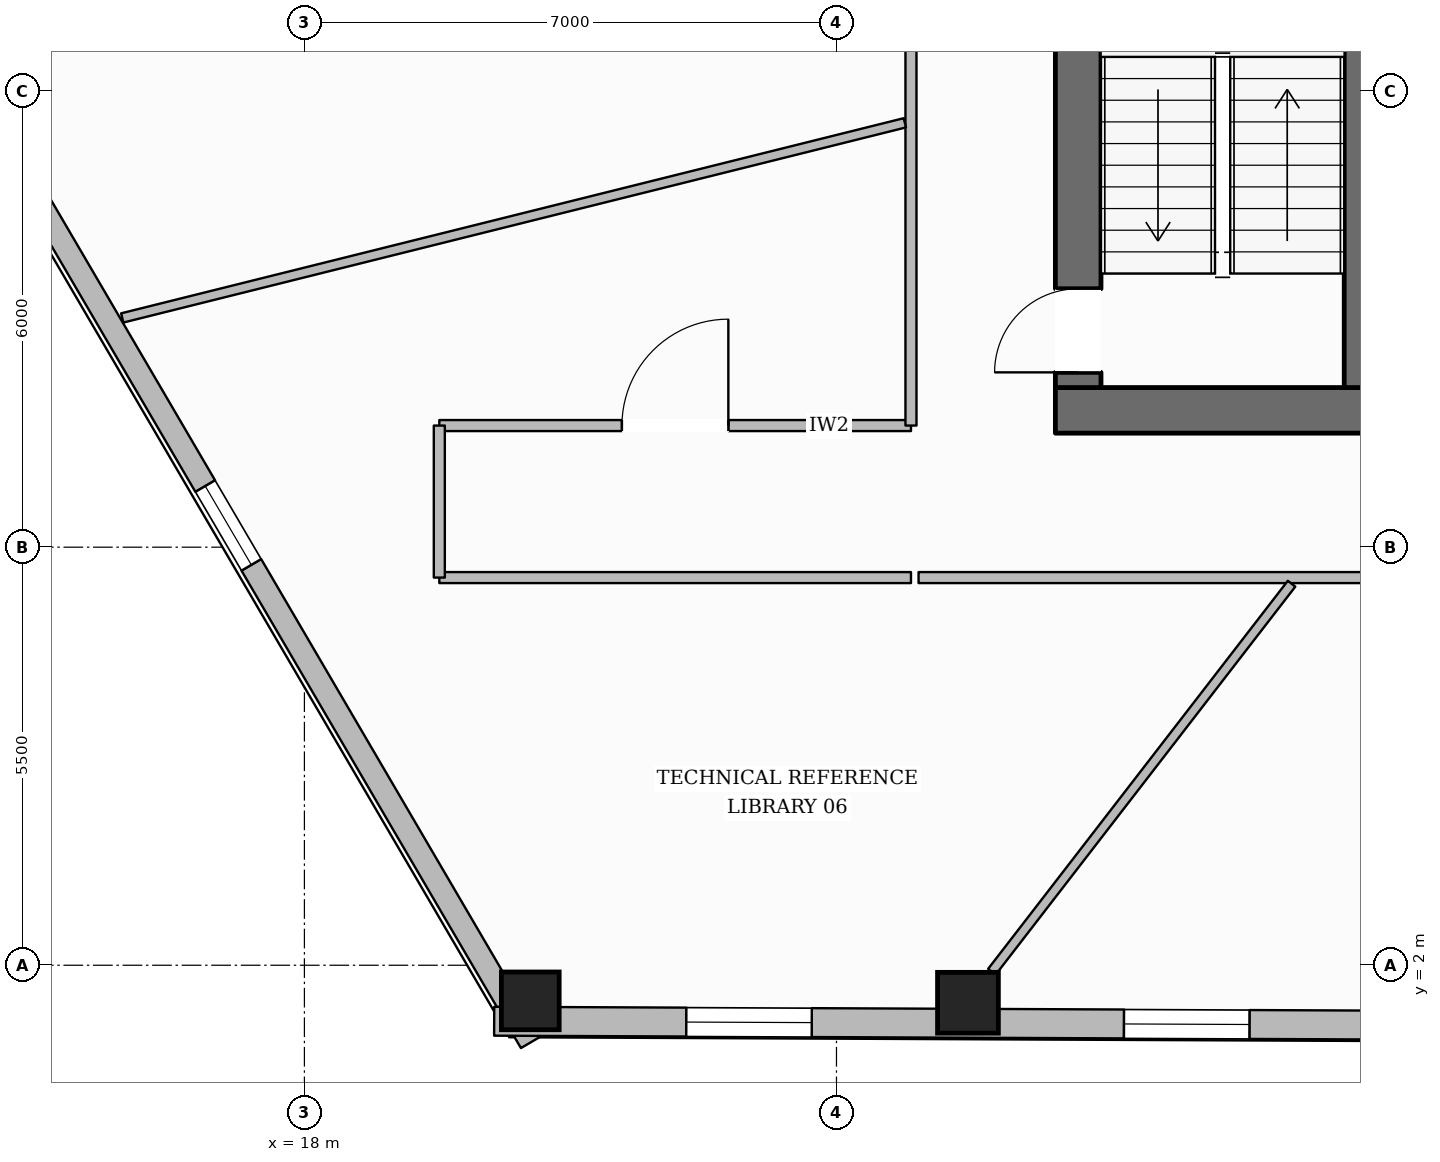
"""IFC4 building model, lengths in metres.
Left out: names, types, materials, properties, quantities, classifications, styles, units other than length and angle.
Written with IfcOpenShell. Run it as: python <this file> out.ifc"""

import sys

from ifc_helpers import new_model, si_unit, direction, frame, frame_2d, origin, origin_2d, place, context, subcontext, project, spatial, rectangle, hollow_rectangle, extrude, element, fill, save


model = new_model("IFC4")
c1 = context("Model", 3, precision=1e-05, world=origin(), true_north=direction((0.0, 1.0)))
c2 = subcontext(c1, "Body", "Model", "MODEL_VIEW")
j1 = project(units=[si_unit("LENGTHUNIT", "METRE"), si_unit("PLANEANGLEUNIT", "RADIAN")], contexts=[c1])
p1 = place(None, origin())
s1 = spatial("IfcSite", under=j1, at=p1, CompositionType="ELEMENT")
p2 = place(p1, origin())
s2 = spatial("IfcBuilding", under=s1, at=p2, CompositionType="ELEMENT")
p3 = place(p2, frame((0.0, 0.0, 52.2)))
s3 = spatial("IfcBuildingStorey", under=s2, at=p3, CompositionType="ELEMENT", Elevation=52.2)
p4 = place(p3, frame((27.88, 9.3, 0.0), z_axis=(0.0, 0.0, 1.0), x_axis=(1.0, 0.0, 0.0)))
e1 = element("IfcWall", 1, at=p4, inside=s3, PredefinedType="SOLIDWALL", context=c2, shape_type="SweptSolid", body=[
    extrude(rectangle(XDim=20.24, YDim=0.6, at=frame_2d((10.12, 0.0))), origin(), (0.0, 0.0, 1.0), 3.59),
])
p5 = place(p4, frame((10.62, 0.0, 0.0)))
e2 = element("IfcOpeningElement", 2, at=p5, cuts=e1, PredefinedType="OPENING", context=c2, shape_type="SweptSolid", body=[
    extrude(rectangle(XDim=1.4, YDim=2.2, at=frame_2d((0.7, 1.1))), frame((0.0, 0.31, 0.0), z_axis=(0.0, -1.0, 0.0), x_axis=(1.0, 0.0, 0.0)), (0.0, 0.0, 1.0), 0.62),
])
p6 = place(p3, frame((28.18, 9.6, 0.0), z_axis=(0.0, 0.0, 1.0), x_axis=(0.0, 1.0, 0.0)))
e3 = element("IfcWall", 3, at=p6, inside=s3, PredefinedType="SOLIDWALL", context=c2, shape_type="SweptSolid", body=[
    extrude(rectangle(XDim=13.0, YDim=0.6, at=frame_2d((6.5, 0.0))), origin(), (0.0, 0.0, 1.0), 3.59),
])
p7 = place(p6, frame((0.2, 0.0, 0.0)))
e4 = element("IfcOpeningElement", 4, at=p7, cuts=e3, PredefinedType="OPENING", context=c2, shape_type="SweptSolid", body=[
    extrude(rectangle(XDim=1.1, YDim=2.15, at=frame_2d((0.55, 1.075))), frame((0.0, 0.31, 0.0), z_axis=(0.0, -1.0, 0.0), x_axis=(1.0, 0.0, 0.0)), (0.0, 0.0, 1.0), 0.62),
])
p8 = place(p6, frame((8.4, 0.0, 0.0)))
e5 = element("IfcOpeningElement", 5, at=p8, cuts=e3, PredefinedType="OPENING", context=c2, shape_type="SweptSolid", body=[
    extrude(rectangle(XDim=0.9, YDim=2.1, at=frame_2d((0.45, 1.05))), frame((0.0, 0.31, 0.0), z_axis=(0.0, -1.0, 0.0), x_axis=(1.0, 0.0, 0.0)), (0.0, 0.0, 1.0), 0.62),
])
p9 = place(p3, frame((31.81, 9.6, 0.0), z_axis=(0.0, 0.0, 1.0), x_axis=(0.0, 1.0, 0.0)))
e6 = element("IfcWall", 6, at=p9, inside=s3, PredefinedType="SHEAR", context=c2, shape_type="SweptSolid", body=[
    extrude(rectangle(XDim=13.0, YDim=0.26, at=frame_2d((6.5, 0.0))), origin(), (0.0, 0.0, 1.0), 3.59),
])
p10 = place(p9, frame((10.925, 0.0, 0.0)))
e7 = element("IfcOpeningElement", 7, at=p10, cuts=e6, PredefinedType="OPENING", context=c2, shape_type="SweptSolid", body=[
    extrude(rectangle(XDim=1.25, YDim=2.25, at=frame_2d((0.625, 1.125))), frame((0.0, 0.14, 0.0), z_axis=(0.0, -1.0, 0.0), x_axis=(1.0, 0.0, 0.0)), (0.0, 0.0, 1.0), 0.28),
])
p11 = place(p3, frame((20.972, 1.531, 0.0), z_axis=(0.0, 0.0, 1.0), x_axis=(1.0, 0.0, 0.0)))
e8 = element("IfcColumn", 8, at=p11, inside=s3, PredefinedType="COLUMN", context=c2, shape_type="SweptSolid", body=[
    extrude(hollow_rectangle(XDim=0.76, YDim=0.76, WallThickness=0.035, at=origin_2d()), origin(), (0.0, 0.0, 1.0), 3.59),
])
p12 = place(p3, frame((26.73, 1.507, 0.0), z_axis=(0.0, 0.0, 1.0), x_axis=(1.0, 0.0, 0.0)))
e9 = element("IfcColumn", 9, at=p12, inside=s3, PredefinedType="COLUMN", context=c2, shape_type="SweptSolid", body=[
    extrude(hollow_rectangle(XDim=0.8, YDim=0.8, WallThickness=0.036, at=origin_2d()), origin(), (0.0, 0.0, 1.0), 3.59),
])
p13 = place(p3, frame((13.02, 14.028, 0.0), z_axis=(0.0, 0.0, 1.0), x_axis=(0.501385664719, 0.86522391045, 0.0)))
e10 = element("IfcWall", 10, at=p13, inside=s3, PredefinedType="STANDARD", context=c2, shape_type="SweptSolid", body=[
    extrude(rectangle(XDim=35.142, YDim=0.38, at=frame_2d((17.571, 0.0))), origin(), (0.0, 0.0, 1.0), 2.97),
])
p14 = place(p13, frame((30.991, 0.0, 0.65)))
e11 = element("IfcOpeningElement", 11, at=p14, cuts=e10, PredefinedType="OPENING", context=c2, shape_type="SweptSolid", body=[
    extrude(rectangle(XDim=1.65, YDim=1.75, at=frame_2d((0.825, 0.875))), frame((0.0, 0.2, 0.0), z_axis=(0.0, -1.0, 0.0), x_axis=(1.0, 0.0, 0.0)), (0.0, 0.0, 1.0), 0.4),
])
p15 = place(p13, frame((25.293, 0.0, 0.65)))
e12 = element("IfcOpeningElement", 12, at=p15, cuts=e10, PredefinedType="OPENING", context=c2, shape_type="SweptSolid", body=[
    extrude(rectangle(XDim=1.65, YDim=1.75, at=frame_2d((0.825, 0.875))), frame((0.0, 0.2, 0.0), z_axis=(0.0, -1.0, 0.0), x_axis=(1.0, 0.0, 0.0)), (0.0, 0.0, 1.0), 0.4),
])
p16 = place(p13, frame((13.898, 0.0, 0.65)))
e13 = element("IfcOpeningElement", 13, at=p16, cuts=e10, PredefinedType="OPENING", context=c2, shape_type="SweptSolid", body=[
    extrude(rectangle(XDim=1.65, YDim=1.75, at=frame_2d((0.825, 0.875))), frame((0.0, 0.2, 0.0), z_axis=(0.0, -1.0, 0.0), x_axis=(1.0, 0.0, 0.0)), (0.0, 0.0, 1.0), 0.4),
])
p17 = place(p13, frame((8.201, 0.0, 0.65)))
e14 = element("IfcOpeningElement", 14, at=p17, cuts=e10, PredefinedType="OPENING", context=c2, shape_type="SweptSolid", body=[
    extrude(rectangle(XDim=1.65, YDim=1.75, at=frame_2d((0.825, 0.875))), frame((0.0, 0.2, 0.0), z_axis=(0.0, -1.0, 0.0), x_axis=(1.0, 0.0, 0.0)), (0.0, 0.0, 1.0), 0.4),
])
p18 = place(p13, frame((2.503, 0.0, 0.65)))
e15 = element("IfcOpeningElement", 15, at=p18, cuts=e10, PredefinedType="OPENING", context=c2, shape_type="SweptSolid", body=[
    extrude(rectangle(XDim=1.65, YDim=1.75, at=frame_2d((0.825, 0.875))), frame((0.0, 0.2, 0.0), z_axis=(0.0, -1.0, 0.0), x_axis=(1.0, 0.0, 0.0)), (0.0, 0.0, 1.0), 0.4),
])
p19 = place(p3, frame((20.978, 0.986, 0.0), z_axis=(0.0, 0.0, 1.0), x_axis=(-0.50510939728, 0.863055326604, 0.0)))
e16 = element("IfcWall", 16, at=p19, inside=s3, PredefinedType="STANDARD", context=c2, shape_type="SweptSolid", body=[
    extrude(rectangle(XDim=15.757, YDim=0.3, at=frame_2d((7.878, 0.0))), origin(), (0.0, 0.0, 1.0), 2.97),
])
p20 = place(p19, frame((7.279, 0.0, 0.65)))
e17 = element("IfcOpeningElement", 17, at=p20, cuts=e16, PredefinedType="OPENING", context=c2, shape_type="SweptSolid", body=[
    extrude(rectangle(XDim=1.2, YDim=1.7, at=frame_2d((0.6, 0.85))), frame((0.0, 0.16, 0.0), z_axis=(0.0, -1.0, 0.0), x_axis=(1.0, 0.0, 0.0)), (0.0, 0.0, 1.0), 0.32),
])
p21 = place(p3, frame((55.997, 1.11, 0.0), z_axis=(0.0, 0.0, 1.0), x_axis=(-0.999990674144, 0.004318752662, 0.0)))
e18 = element("IfcWall", 18, at=p21, inside=s3, PredefinedType="STANDARD", context=c2, shape_type="SweptSolid", body=[
    extrude(rectangle(XDim=35.501, YDim=0.38, at=frame_2d((17.75, 0.0))), origin(), (0.0, 0.0, 1.0), 2.97),
])
p22 = place(p21, frame((31.323, 0.0, 0.65)))
e19 = element("IfcOpeningElement", 19, at=p22, cuts=e18, PredefinedType="OPENING", context=c2, shape_type="SweptSolid", body=[
    extrude(rectangle(XDim=1.65, YDim=1.75, at=frame_2d((0.825, 0.875))), frame((0.0, 0.2, 0.0), z_axis=(0.0, -1.0, 0.0), x_axis=(1.0, 0.0, 0.0)), (0.0, 0.0, 1.0), 0.4),
])
p23 = place(p21, frame((25.565, 0.0, 0.65)))
e20 = element("IfcOpeningElement", 20, at=p23, cuts=e18, PredefinedType="OPENING", context=c2, shape_type="SweptSolid", body=[
    extrude(rectangle(XDim=1.65, YDim=1.75, at=frame_2d((0.825, 0.875))), frame((0.0, 0.2, 0.0), z_axis=(0.0, -1.0, 0.0), x_axis=(1.0, 0.0, 0.0)), (0.0, 0.0, 1.0), 0.4),
])
p24 = place(p21, frame((14.049, 0.0, 0.65)))
e21 = element("IfcOpeningElement", 21, at=p24, cuts=e18, PredefinedType="OPENING", context=c2, shape_type="SweptSolid", body=[
    extrude(rectangle(XDim=1.65, YDim=1.75, at=frame_2d((0.825, 0.875))), frame((0.0, 0.2, 0.0), z_axis=(0.0, -1.0, 0.0), x_axis=(1.0, 0.0, 0.0)), (0.0, 0.0, 1.0), 0.4),
])
p25 = place(p21, frame((8.29, 0.0, 0.65)))
e22 = element("IfcOpeningElement", 22, at=p25, cuts=e18, PredefinedType="OPENING", context=c2, shape_type="SweptSolid", body=[
    extrude(rectangle(XDim=1.65, YDim=1.75, at=frame_2d((0.825, 0.875))), frame((0.0, 0.2, 0.0), z_axis=(0.0, -1.0, 0.0), x_axis=(1.0, 0.0, 0.0)), (0.0, 0.0, 1.0), 0.4),
])
p26 = place(p21, frame((2.532, 0.0, 0.65)))
e23 = element("IfcOpeningElement", 23, at=p26, cuts=e18, PredefinedType="OPENING", context=c2, shape_type="SweptSolid", body=[
    extrude(rectangle(XDim=1.65, YDim=1.75, at=frame_2d((0.825, 0.875))), frame((0.0, 0.2, 0.0), z_axis=(0.0, -1.0, 0.0), x_axis=(1.0, 0.0, 0.0)), (0.0, 0.0, 1.0), 0.4),
])
p27 = place(p3, frame((19.775, 9.1, 0.0), z_axis=(0.0, 0.0, 1.0), x_axis=(1.0, 0.0, 0.0)))
e24 = element("IfcWall", 24, at=p27, inside=s3, PredefinedType="PARTITIONING", context=c2, shape_type="SweptSolid", body=[
    extrude(rectangle(XDim=6.205, YDim=0.145, at=frame_2d((3.103, 0.0))), origin(), (0.0, 0.0, 1.0), 3.59),
])
p28 = place(p27, frame((2.403, 0.0, 0.0)))
e25 = element("IfcOpeningElement", 25, at=p28, cuts=e24, PredefinedType="OPENING", context=c2, shape_type="SweptSolid", body=[
    extrude(rectangle(XDim=1.4, YDim=2.2, at=frame_2d((0.7, 1.1))), frame((0.0, 0.083, 0.0), z_axis=(0.0, -1.0, 0.0), x_axis=(1.0, 0.0, 0.0)), (0.0, 0.0, 1.0), 0.165),
])
p29 = place(p3, frame((25.98, 9.1, 0.0), z_axis=(0.0, 0.0, 1.0), x_axis=(0.0, 1.0, 0.0)))
e26 = element("IfcWall", 26, at=p29, inside=s3, PredefinedType="PARTITIONING", context=c2, shape_type="SweptSolid", body=[
    extrude(rectangle(XDim=16.0, YDim=0.145, at=frame_2d((8.0, 0.0))), origin(), (0.0, 0.0, 1.0), 3.278),
])
p30 = place(p29, frame((13.722, 0.0, 0.0)))
e27 = element("IfcOpeningElement", 27, at=p30, cuts=e26, PredefinedType="OPENING", context=c2, shape_type="SweptSolid", body=[
    extrude(rectangle(XDim=0.98, YDim=2.15, at=frame_2d((0.49, 1.075))), frame((0.0, 0.083, 0.0), z_axis=(0.0, -1.0, 0.0), x_axis=(1.0, 0.0, 0.0)), (0.0, 0.0, 1.0), 0.165),
])
p31 = place(p29, frame((7.387, 0.0, 0.0)))
e28 = element("IfcOpeningElement", 28, at=p31, cuts=e26, PredefinedType="OPENING", context=c2, shape_type="SweptSolid", body=[
    extrude(rectangle(XDim=1.4, YDim=2.2, at=frame_2d((0.7, 1.1))), frame((0.0, 0.083, 0.0), z_axis=(0.0, -1.0, 0.0), x_axis=(1.0, 0.0, 0.0)), (0.0, 0.0, 1.0), 0.165),
])
p32 = place(p3, frame((49.92, 7.1, 0.0), z_axis=(0.0, 0.0, 1.0), x_axis=(-1.0, 0.0, 0.0)))
e29 = element("IfcWall", 29, at=p32, inside=s3, PredefinedType="PARTITIONING", context=c2, shape_type="SweptSolid", body=[
    extrude(rectangle(XDim=23.84, YDim=0.145, at=frame_2d((11.92, 0.0))), origin(), (0.0, 0.0, 1.0), 3.278),
])
p33 = place(p32, frame((11.094, 0.0, 0.0)))
e30 = element("IfcOpeningElement", 30, at=p33, cuts=e29, PredefinedType="OPENING", context=c2, shape_type="SweptSolid", body=[
    extrude(rectangle(XDim=1.4, YDim=2.2, at=frame_2d((0.7, 1.1))), frame((0.0, 0.083, 0.0), z_axis=(0.0, -1.0, 0.0), x_axis=(1.0, 0.0, 0.0)), (0.0, 0.0, 1.0), 0.165),
])
p34 = place(p3, frame((25.98, 7.1, 0.0), z_axis=(0.0, 0.0, 1.0), x_axis=(-1.0, 0.0, 0.0)))
e31 = element("IfcWall", 31, at=p34, inside=s3, PredefinedType="PARTITIONING", context=c2, shape_type="SweptSolid", body=[
    extrude(rectangle(XDim=6.205, YDim=0.145, at=frame_2d((3.103, 0.0))), origin(), (0.0, 0.0, 1.0), 3.59),
])
p35 = place(p3, frame((19.775, 7.1, 0.0), z_axis=(0.0, 0.0, 1.0), x_axis=(0.0, 1.0, 0.0)))
e32 = element("IfcWall", 32, at=p35, inside=s3, PredefinedType="PARTITIONING", context=c2, shape_type="SweptSolid", body=[
    extrude(rectangle(XDim=2.0, YDim=0.145, at=frame_2d((1.0, 0.0))), origin(), (0.0, 0.0, 1.0), 3.59),
])
p36 = place(p3, frame((25.899, 13.083, 0.0), z_axis=(0.0, 0.0, 1.0), x_axis=(-0.970293892869, -0.241929248874, 0.0)))
e33 = element("IfcWall", 33, at=p36, inside=s3, PredefinedType="PARTITIONING", context=c2, shape_type="SweptSolid", body=[
    extrude(rectangle(XDim=10.611, YDim=0.125, at=frame_2d((5.306, 0.0))), origin(), (0.0, 0.0, 1.0), 3.59),
])
p37 = place(p3, frame((30.987, 7.02, 0.0), z_axis=(0.0, 0.0, 1.0), x_axis=(-0.61121694186, -0.791463107152, 0.0)))
e34 = element("IfcWall", 34, at=p37, inside=s3, PredefinedType="PARTITIONING", context=c2, shape_type="SweptSolid", body=[
    extrude(rectangle(XDim=6.45, YDim=0.125, at=frame_2d((3.225, 0.0))), origin(), (0.0, 0.0, 1.0), 3.59),
])
p38 = place(p22, origin())
e35 = element("IfcWindow", 35, at=p38, inside=s3, PartitioningType="SINGLE_PANEL", PredefinedType="WINDOW", context=c2, shape_type="SweptSolid", body=[
    extrude(rectangle(XDim=1.65, YDim=1.75, at=frame_2d((0.825, 0.875))), frame((0.0, 0.03, 0.0), z_axis=(0.0, -1.0, 0.0), x_axis=(1.0, 0.0, 0.0)), (0.0, 0.0, 1.0), 0.06),
])
fill(e19, e35)
p39 = place(p23, origin())
e36 = element("IfcWindow", 36, at=p39, inside=s3, PartitioningType="SINGLE_PANEL", PredefinedType="WINDOW", context=c2, shape_type="SweptSolid", body=[
    extrude(rectangle(XDim=1.65, YDim=1.75, at=frame_2d((0.825, 0.875))), frame((0.0, 0.03, 0.0), z_axis=(0.0, -1.0, 0.0), x_axis=(1.0, 0.0, 0.0)), (0.0, 0.0, 1.0), 0.06),
])
fill(e20, e36)
p40 = place(p20, origin())
e37 = element("IfcWindow", 37, at=p40, inside=s3, PartitioningType="SINGLE_PANEL", PredefinedType="WINDOW", context=c2, shape_type="SweptSolid", body=[
    extrude(rectangle(XDim=1.2, YDim=1.7, at=frame_2d((0.6, 0.85))), frame((0.0, 0.03, 0.0), z_axis=(0.0, -1.0, 0.0), x_axis=(1.0, 0.0, 0.0)), (0.0, 0.0, 1.0), 0.06),
])
fill(e17, e37)
p41 = place(p7, origin())
e38 = element("IfcDoor", 38, at=p41, inside=s3, OperationType="SINGLE_SWING_LEFT", PredefinedType="DOOR", context=c2, shape_type="SweptSolid", body=[
    extrude(rectangle(XDim=1.1, YDim=2.15, at=frame_2d((0.55, 1.075))), frame((0.0, 0.025, 0.0), z_axis=(0.0, -1.0, 0.0), x_axis=(1.0, 0.0, 0.0)), (0.0, 0.0, 1.0), 0.05),
])
fill(e4, e38)
p42 = place(p28, origin())
e39 = element("IfcDoor", 39, at=p42, inside=s3, OperationType="SINGLE_SWING_RIGHT", PredefinedType="DOOR", context=c2, shape_type="SweptSolid", body=[
    extrude(rectangle(XDim=1.4, YDim=2.2, at=frame_2d((0.7, 1.1))), frame((0.0, 0.025, 0.0), z_axis=(0.0, -1.0, 0.0), x_axis=(1.0, 0.0, 0.0)), (0.0, 0.0, 1.0), 0.05),
])
fill(e25, e39)
save(model, sys.argv[1])
